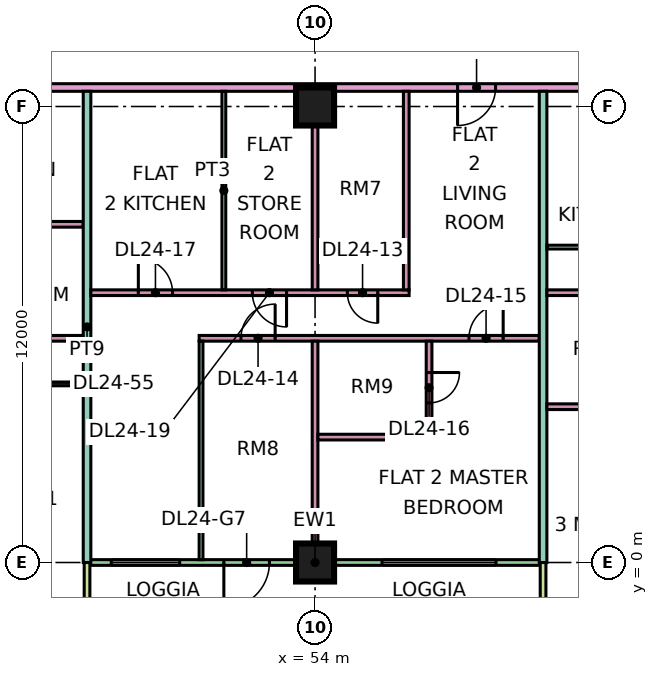
"""IFC4 building model, lengths in metres.
Left out: names, types, materials, properties, quantities, classifications, styles, units other than length and angle.
Written with IfcOpenShell. Run it as: python <this file> out.ifc"""

import sys

from ifc_helpers import new_model, si_unit, direction, frame, frame_2d, origin, origin_2d, place, context, subcontext, project, spatial, rectangle, extrude, element, fill, save


model = new_model("IFC4")
c1 = context("Model", 3, precision=1e-05, world=origin(), true_north=direction((0.0, 1.0)))
c2 = subcontext(c1, "Body", "Model", "MODEL_VIEW")
j1 = project(units=[si_unit("LENGTHUNIT", "METRE"), si_unit("PLANEANGLEUNIT", "RADIAN")], contexts=[c1])
p1 = place(None, origin())
s1 = spatial("IfcSite", under=j1, at=p1, CompositionType="ELEMENT")
p2 = place(p1, origin())
s2 = spatial("IfcBuilding", under=s1, at=p2, CompositionType="ELEMENT")
p3 = place(p2, frame((0.0, 0.0, 106.9)))
s3 = spatial("IfcBuildingStorey", under=s2, at=p3, CompositionType="ELEMENT", Elevation=106.9)
for number, where, z_axis, x_axis in (
    (1, (54.0, 0.0, 0.0), (0.0, 0.0, 1.0), (1.0, 0.0, 0.0)),
    (2, (54.0, 12.0, 0.0), (0.0, 0.0, 1.0), (1.0, 0.0, 0.0)),
):
    element("IfcColumn", number, at=place(p3, frame(where, z_axis=z_axis, x_axis=x_axis)), inside=s3, PredefinedType="COLUMN", context=c2, shape_type="SweptSolid", body=[
        extrude(rectangle(XDim=1.0, YDim=1.0, at=origin_2d()), origin(), (0.0, 0.0, 1.0), 3.75),
    ])
p4 = place(p3, frame((48.075, 0.0, 0.0), z_axis=(0.0, 0.0, 1.0), x_axis=(1.0, 0.0, 0.0)))
e3 = element("IfcWall", 3, at=p4, inside=s3, PredefinedType="SOLIDWALL", context=c2, shape_type="SweptSolid", body=[
    extrude(rectangle(XDim=11.85, YDim=0.15, at=frame_2d((5.925, 0.0))), origin(), (0.0, 0.0, 1.0), 3.35),
])
p5 = place(p4, frame((0.562, 0.0, 0.45)))
e4 = element("IfcOpeningElement", 4, at=p5, cuts=e3, PredefinedType="OPENING", context=c2, shape_type="SweptSolid", body=[
    extrude(rectangle(XDim=1.8, YDim=2.4, at=frame_2d((0.9, 1.2))), frame((0.0, 0.085, 0.0), z_axis=(0.0, -1.0, 0.0), x_axis=(1.0, 0.0, 0.0)), (0.0, 0.0, 1.0), 0.17),
])
p6 = place(p4, frame((3.525, 0.0, 0.0)))
e5 = element("IfcOpeningElement", 5, at=p6, cuts=e3, PredefinedType="OPENING", context=c2, shape_type="SweptSolid", body=[
    extrude(rectangle(XDim=1.2, YDim=2.4, at=frame_2d((0.6, 1.2))), frame((0.0, 0.085, 0.0), z_axis=(0.0, -1.0, 0.0), x_axis=(1.0, 0.0, 0.0)), (0.0, 0.0, 1.0), 0.17),
])
p7 = place(p4, frame((7.688, 0.0, 0.45)))
e6 = element("IfcOpeningElement", 6, at=p7, cuts=e3, PredefinedType="OPENING", context=c2, shape_type="SweptSolid", body=[
    extrude(rectangle(XDim=3.0, YDim=2.4, at=frame_2d((1.5, 1.2))), frame((0.0, 0.085, 0.0), z_axis=(0.0, -1.0, 0.0), x_axis=(1.0, 0.0, 0.0)), (0.0, 0.0, 1.0), 0.17),
])
for number, where, z_axis, x_axis in (
    (7, (48.0, -1.5, 0.0), (0.0, 0.0, 1.0), (0.0, 1.0, 0.0)),
    (8, (60.0, -1.5, 0.0), (0.0, 0.0, 1.0), (0.0, 1.0, 0.0)),
):
    element("IfcWall", number, at=place(p3, frame(where, z_axis=z_axis, x_axis=x_axis)), inside=s3, PredefinedType="SOLIDWALL", context=c2, shape_type="SweptSolid", body=[
        extrude(rectangle(XDim=1.5, YDim=0.15, at=frame_2d((0.75, 0.0))), origin(), (0.0, 0.0, 1.0), 3.35),
    ])
p8 = place(p3, frame((33.05, 4.7, 0.0), z_axis=(0.0, 0.0, 1.0), x_axis=(1.0, 0.0, 0.0)))
e9 = element("IfcWall", 9, at=p8, inside=s3, PredefinedType="PARTITIONING", context=c2, shape_type="SweptSolid", body=[
    extrude(rectangle(XDim=14.85, YDim=0.1, at=frame_2d((7.425, 0.0))), origin(), (0.0, 0.0, 1.0), 3.35),
])
p9 = place(p8, frame((10.0, 0.0, 0.0)))
e10 = element("IfcOpeningElement", 10, at=p9, cuts=e9, PredefinedType="OPENING", context=c2, shape_type="SweptSolid", body=[
    extrude(rectangle(XDim=0.9, YDim=2.1, at=frame_2d((0.45, 1.05))), frame((0.0, 0.06, 0.0), z_axis=(0.0, -1.0, 0.0), x_axis=(1.0, 0.0, 0.0)), (0.0, 0.0, 1.0), 0.12),
])
p10 = place(p8, frame((13.0, 0.0, 0.0)))
e11 = element("IfcOpeningElement", 11, at=p10, cuts=e9, PredefinedType="OPENING", context=c2, shape_type="SweptSolid", body=[
    extrude(rectangle(XDim=0.9, YDim=2.1, at=frame_2d((0.45, 1.05))), frame((0.0, 0.06, 0.0), z_axis=(0.0, -1.0, 0.0), x_axis=(1.0, 0.0, 0.0)), (0.0, 0.0, 1.0), 0.12),
])
p11 = place(p8, frame((4.0, 0.0, 0.0)))
e12 = element("IfcOpeningElement", 12, at=p11, cuts=e9, PredefinedType="OPENING", context=c2, shape_type="SweptSolid", body=[
    extrude(rectangle(XDim=0.9, YDim=2.1, at=frame_2d((0.45, 1.05))), frame((0.0, 0.06, 0.0), z_axis=(0.0, -1.0, 0.0), x_axis=(1.0, 0.0, 0.0)), (0.0, 0.0, 1.0), 0.12),
])
p12 = place(p3, frame((40.65, 12.5, 0.0), z_axis=(0.0, 0.0, 1.0), x_axis=(1.0, 0.0, 0.0)))
e13 = element("IfcWall", 13, at=p12, inside=s3, PredefinedType="PARTITIONING", context=c2, shape_type="SweptSolid", body=[
    extrude(rectangle(XDim=31.35, YDim=0.2, at=frame_2d((15.675, 0.0))), origin(), (0.0, 0.0, 1.0), 3.35),
])
p13 = place(p12, frame((17.1, 0.0, 0.0)))
e14 = element("IfcOpeningElement", 14, at=p13, cuts=e13, PredefinedType="OPENING", context=c2, shape_type="SweptSolid", body=[
    extrude(rectangle(XDim=1.0, YDim=2.1, at=frame_2d((0.5, 1.05))), frame((0.0, 0.11, 0.0), z_axis=(0.0, -1.0, 0.0), x_axis=(1.0, 0.0, 0.0)), (0.0, 0.0, 1.0), 0.22),
])
p14 = place(p12, frame((23.7, 0.0, 0.0)))
e15 = element("IfcOpeningElement", 15, at=p14, cuts=e13, PredefinedType="OPENING", context=c2, shape_type="SweptSolid", body=[
    extrude(rectangle(XDim=1.0, YDim=2.1, at=frame_2d((0.5, 1.05))), frame((0.0, 0.11, 0.0), z_axis=(0.0, -1.0, 0.0), x_axis=(1.0, 0.0, 0.0)), (0.0, 0.0, 1.0), 0.22),
])
p15 = place(p12, frame((1.05, 0.0, 0.0)))
e16 = element("IfcOpeningElement", 16, at=p15, cuts=e13, PredefinedType="OPENING", context=c2, shape_type="SweptSolid", body=[
    extrude(rectangle(XDim=1.0, YDim=2.1, at=frame_2d((0.5, 1.05))), frame((0.0, 0.11, 0.0), z_axis=(0.0, -1.0, 0.0), x_axis=(1.0, 0.0, 0.0)), (0.0, 0.0, 1.0), 0.22),
])
p16 = place(p3, frame((43.725, 5.9, 0.0), z_axis=(0.0, 0.0, 1.0), x_axis=(1.0, 0.0, 0.0)))
e17 = element("IfcWall", 17, at=p16, inside=s3, PredefinedType="PARTITIONING", context=c2, shape_type="SweptSolid", body=[
    extrude(rectangle(XDim=4.175, YDim=0.15, at=frame_2d((2.087, 0.0))), origin(), (0.0, 0.0, 1.0), 3.35),
])
p17 = place(p16, frame((1.675, 0.0, 0.0)))
e18 = element("IfcOpeningElement", 18, at=p17, cuts=e17, PredefinedType="OPENING", context=c2, shape_type="SweptSolid", body=[
    extrude(rectangle(XDim=0.8, YDim=2.1, at=frame_2d((0.4, 1.05))), frame((0.0, 0.085, 0.0), z_axis=(0.0, -1.0, 0.0), x_axis=(1.0, 0.0, 0.0)), (0.0, 0.0, 1.0), 0.17),
])
p18 = place(p3, frame((43.725, 8.9, 0.0), z_axis=(0.0, 0.0, 1.0), x_axis=(1.0, 0.0, 0.0)))
e19 = element("IfcWall", 19, at=p18, inside=s3, PredefinedType="PARTITIONING", context=c2, shape_type="SweptSolid", body=[
    extrude(rectangle(XDim=4.175, YDim=0.15, at=frame_2d((2.087, 0.0))), origin(), (0.0, 0.0, 1.0), 3.35),
])
p19 = place(p3, frame((48.0, 0.0, 0.0), z_axis=(0.0, 0.0, 1.0), x_axis=(0.0, 1.0, 0.0)))
e20 = element("IfcWall", 20, at=p19, inside=s3, PredefinedType="PARTITIONING", context=c2, shape_type="SweptSolid", body=[
    extrude(rectangle(XDim=12.4, YDim=0.2, at=frame_2d((6.2, 0.0))), origin(), (0.0, 0.0, 1.0), 3.35),
])
p20 = place(p3, frame((48.1, 7.1, 0.0), z_axis=(0.0, 0.0, 1.0), x_axis=(1.0, 0.0, 0.0)))
e21 = element("IfcWall", 21, at=p20, inside=s3, PredefinedType="PARTITIONING", context=c2, shape_type="SweptSolid", body=[
    extrude(rectangle(XDim=8.375, YDim=0.15, at=frame_2d((4.188, 0.0))), origin(), (0.0, 0.0, 1.0), 3.35),
])
p21 = place(p20, frame((6.75, 0.0, 0.0)))
e22 = element("IfcOpeningElement", 22, at=p21, cuts=e21, PredefinedType="OPENING", context=c2, shape_type="SweptSolid", body=[
    extrude(rectangle(XDim=0.8, YDim=2.1, at=frame_2d((0.4, 1.05))), frame((0.0, 0.085, 0.0), z_axis=(0.0, -1.0, 0.0), x_axis=(1.0, 0.0, 0.0)), (0.0, 0.0, 1.0), 0.17),
])
p22 = place(p20, frame((1.25, 0.0, 0.0)))
e23 = element("IfcOpeningElement", 23, at=p22, cuts=e21, PredefinedType="OPENING", context=c2, shape_type="SweptSolid", body=[
    extrude(rectangle(XDim=0.9, YDim=2.1, at=frame_2d((0.45, 1.05))), frame((0.0, 0.085, 0.0), z_axis=(0.0, -1.0, 0.0), x_axis=(1.0, 0.0, 0.0)), (0.0, 0.0, 1.0), 0.17),
])
p23 = place(p20, frame((4.25, 0.0, 0.0)))
e24 = element("IfcOpeningElement", 24, at=p23, cuts=e21, PredefinedType="OPENING", context=c2, shape_type="SweptSolid", body=[
    extrude(rectangle(XDim=0.9, YDim=2.1, at=frame_2d((0.45, 1.05))), frame((0.0, 0.085, 0.0), z_axis=(0.0, -1.0, 0.0), x_axis=(1.0, 0.0, 0.0)), (0.0, 0.0, 1.0), 0.17),
])
p24 = place(p3, frame((50.95, 5.9, 0.0), z_axis=(0.0, 0.0, 1.0), x_axis=(1.0, 0.0, 0.0)))
e25 = element("IfcWall", 25, at=p24, inside=s3, PredefinedType="PARTITIONING", context=c2, shape_type="SweptSolid", body=[
    extrude(rectangle(XDim=8.95, YDim=0.15, at=frame_2d((4.475, 0.0))), origin(), (0.0, 0.0, 1.0), 3.35),
])
p25 = place(p24, frame((1.1, 0.0, 0.0)))
e26 = element("IfcOpeningElement", 26, at=p25, cuts=e25, PredefinedType="OPENING", context=c2, shape_type="SweptSolid", body=[
    extrude(rectangle(XDim=0.9, YDim=2.1, at=frame_2d((0.45, 1.05))), frame((0.0, 0.085, 0.0), z_axis=(0.0, -1.0, 0.0), x_axis=(1.0, 0.0, 0.0)), (0.0, 0.0, 1.0), 0.17),
])
p26 = place(p24, frame((7.1, 0.0, 0.0)))
e27 = element("IfcOpeningElement", 27, at=p26, cuts=e25, PredefinedType="OPENING", context=c2, shape_type="SweptSolid", body=[
    extrude(rectangle(XDim=0.9, YDim=2.1, at=frame_2d((0.45, 1.05))), frame((0.0, 0.085, 0.0), z_axis=(0.0, -1.0, 0.0), x_axis=(1.0, 0.0, 0.0)), (0.0, 0.0, 1.0), 0.17),
])
p27 = place(p3, frame((51.0, 0.074, 0.0), z_axis=(0.0, 0.0, 1.0), x_axis=(0.0, 1.0, 0.0)))
e28 = element("IfcWall", 28, at=p27, inside=s3, PredefinedType="PARTITIONING", context=c2, shape_type="SweptSolid", body=[
    extrude(rectangle(XDim=5.751, YDim=0.1, at=frame_2d((2.875, 0.0))), origin(), (0.0, 0.0, 1.0), 3.35),
])
p28 = place(p3, frame((51.6, 7.175, 0.0), z_axis=(0.0, 0.0, 1.0), x_axis=(0.0, 1.0, 0.0)))
e29 = element("IfcWall", 29, at=p28, inside=s3, PredefinedType="PARTITIONING", context=c2, shape_type="SweptSolid", body=[
    extrude(rectangle(XDim=5.225, YDim=0.1, at=frame_2d((2.612, 0.0))), origin(), (0.0, 0.0, 1.0), 3.35),
])
p29 = place(p3, frame((54.0, 0.074, 0.0), z_axis=(0.0, 0.0, 1.0), x_axis=(0.0, 1.0, 0.0)))
e30 = element("IfcWall", 30, at=p29, inside=s3, PredefinedType="PARTITIONING", context=c2, shape_type="SweptSolid", body=[
    extrude(rectangle(XDim=5.751, YDim=0.15, at=frame_2d((2.875, 0.0))), origin(), (0.0, 0.0, 1.0), 3.35),
])
p30 = place(p3, frame((54.0, 7.175, 0.0), z_axis=(0.0, 0.0, 1.0), x_axis=(0.0, 1.0, 0.0)))
e31 = element("IfcWall", 31, at=p30, inside=s3, PredefinedType="PARTITIONING", context=c2, shape_type="SweptSolid", body=[
    extrude(rectangle(XDim=5.225, YDim=0.15, at=frame_2d((2.612, 0.0))), origin(), (0.0, 0.0, 1.0), 3.35),
])
p31 = place(p3, frame((54.075, 3.3, 0.0), z_axis=(0.0, 0.0, 1.0), x_axis=(1.0, 0.0, 0.0)))
e32 = element("IfcWall", 32, at=p31, inside=s3, PredefinedType="PARTITIONING", context=c2, shape_type="SweptSolid", body=[
    extrude(rectangle(XDim=3.0, YDim=0.15, at=frame_2d((1.5, 0.0))), origin(), (0.0, 0.0, 1.0), 3.35),
])
p32 = place(p3, frame((56.4, 7.175, 0.0), z_axis=(0.0, 0.0, 1.0), x_axis=(0.0, 1.0, 0.0)))
e33 = element("IfcWall", 33, at=p32, inside=s3, PredefinedType="PARTITIONING", context=c2, shape_type="SweptSolid", body=[
    extrude(rectangle(XDim=5.225, YDim=0.15, at=frame_2d((2.612, 0.0))), origin(), (0.0, 0.0, 1.0), 3.35),
])
p33 = place(p3, frame((57.0, 3.375, 0.0), z_axis=(0.0, 0.0, 1.0), x_axis=(0.0, 1.0, 0.0)))
e34 = element("IfcWall", 34, at=p33, inside=s3, PredefinedType="PARTITIONING", context=c2, shape_type="SweptSolid", body=[
    extrude(rectangle(XDim=2.45, YDim=0.15, at=frame_2d((1.225, 0.0))), origin(), (0.0, 0.0, 1.0), 3.35),
])
p34 = place(p33, frame((0.825, 0.0, 0.0)))
e35 = element("IfcOpeningElement", 35, at=p34, cuts=e34, PredefinedType="OPENING", context=c2, shape_type="SweptSolid", body=[
    extrude(rectangle(XDim=0.8, YDim=2.1, at=frame_2d((0.4, 1.05))), frame((0.0, 0.085, 0.0), z_axis=(0.0, -1.0, 0.0), x_axis=(1.0, 0.0, 0.0)), (0.0, 0.0, 1.0), 0.17),
])
p35 = place(p3, frame((60.0, 0.0, 0.0), z_axis=(0.0, 0.0, 1.0), x_axis=(0.0, 1.0, 0.0)))
e36 = element("IfcWall", 36, at=p35, inside=s3, PredefinedType="PARTITIONING", context=c2, shape_type="SweptSolid", body=[
    extrude(rectangle(XDim=12.4, YDim=0.2, at=frame_2d((6.2, 0.0))), origin(), (0.0, 0.0, 1.0), 3.35),
])
p36 = place(p3, frame((60.1, 4.1, 0.0), z_axis=(0.0, 0.0, 1.0), x_axis=(1.0, 0.0, 0.0)))
e37 = element("IfcWall", 37, at=p36, inside=s3, PredefinedType="PARTITIONING", context=c2, shape_type="SweptSolid", body=[
    extrude(rectangle(XDim=2.825, YDim=0.15, at=frame_2d((1.413, 0.0))), origin(), (0.0, 0.0, 1.0), 3.35),
])
p37 = place(p3, frame((60.1, 7.1, 0.0), z_axis=(0.0, 0.0, 1.0), x_axis=(1.0, 0.0, 0.0)))
e38 = element("IfcWall", 38, at=p37, inside=s3, PredefinedType="PARTITIONING", context=c2, shape_type="SweptSolid", body=[
    extrude(rectangle(XDim=5.95, YDim=0.15, at=frame_2d((2.975, 0.0))), origin(), (0.0, 0.0, 1.0), 3.35),
])
p38 = place(p37, frame((3.95, 0.0, 0.0)))
e39 = element("IfcOpeningElement", 39, at=p38, cuts=e38, PredefinedType="OPENING", context=c2, shape_type="SweptSolid", body=[
    extrude(rectangle(XDim=0.9, YDim=2.1, at=frame_2d((0.45, 1.05))), frame((0.0, 0.085, 0.0), z_axis=(0.0, -1.0, 0.0), x_axis=(1.0, 0.0, 0.0)), (0.0, 0.0, 1.0), 0.17),
])
p39 = place(p3, frame((60.1, 8.3, 0.0), z_axis=(0.0, 0.0, 1.0), x_axis=(1.0, 0.0, 0.0)))
e40 = element("IfcWall", 40, at=p39, inside=s3, PredefinedType="PARTITIONING", context=c2, shape_type="SweptSolid", body=[
    extrude(rectangle(XDim=2.85, YDim=0.1, at=frame_2d((1.425, 0.0))), origin(), (0.0, 0.0, 1.0), 3.35),
])
p40 = place(p5, origin())
e41 = element("IfcWindow", 41, at=p40, inside=s3, PartitioningType="SINGLE_PANEL", PredefinedType="WINDOW", context=c2, shape_type="SweptSolid", body=[
    extrude(rectangle(XDim=1.8, YDim=2.4, at=frame_2d((0.9, 1.2))), frame((0.0, 0.03, 0.0), z_axis=(0.0, -1.0, 0.0), x_axis=(1.0, 0.0, 0.0)), (0.0, 0.0, 1.0), 0.06),
])
fill(e4, e41)
p41 = place(p6, frame((1.2, 0.0, 0.0), z_axis=(0.0, 0.0, 1.0), x_axis=(-1.0, 0.0, 0.0)))
e42 = element("IfcDoor", 42, at=p41, inside=s3, OperationType="DOUBLE_DOOR_SINGLE_SWING", PredefinedType="DOOR", context=c2, shape_type="SweptSolid", body=[
    extrude(rectangle(XDim=1.2, YDim=2.4, at=frame_2d((0.6, 1.2))), frame((0.0, 0.025, 0.0), z_axis=(0.0, -1.0, 0.0), x_axis=(1.0, 0.0, 0.0)), (0.0, 0.0, 1.0), 0.05),
])
fill(e5, e42)
p42 = place(p7, origin())
e43 = element("IfcWindow", 43, at=p42, inside=s3, PartitioningType="SINGLE_PANEL", PredefinedType="WINDOW", context=c2, shape_type="SweptSolid", body=[
    extrude(rectangle(XDim=3.0, YDim=2.4, at=frame_2d((1.5, 1.2))), frame((0.0, 0.03, 0.0), z_axis=(0.0, -1.0, 0.0), x_axis=(1.0, 0.0, 0.0)), (0.0, 0.0, 1.0), 0.06),
])
fill(e6, e43)
p43 = place(p21, origin())
e44 = element("IfcDoor", 44, at=p43, inside=s3, OperationType="SINGLE_SWING_RIGHT", PredefinedType="DOOR", context=c2, shape_type="SweptSolid", body=[
    extrude(rectangle(XDim=0.8, YDim=2.1, at=frame_2d((0.4, 1.05))), frame((0.0, 0.025, 0.0), z_axis=(0.0, -1.0, 0.0), x_axis=(1.0, 0.0, 0.0)), (0.0, 0.0, 1.0), 0.05),
])
fill(e22, e44)
p44 = place(p25, frame((0.9, 0.0, 0.0), z_axis=(0.0, 0.0, 1.0), x_axis=(-1.0, 0.0, 0.0)))
e45 = element("IfcDoor", 45, at=p44, inside=s3, OperationType="SINGLE_SWING_RIGHT", PredefinedType="DOOR", context=c2, shape_type="SweptSolid", body=[
    extrude(rectangle(XDim=0.9, YDim=2.1, at=frame_2d((0.45, 1.05))), frame((0.0, 0.025, 0.0), z_axis=(0.0, -1.0, 0.0), x_axis=(1.0, 0.0, 0.0)), (0.0, 0.0, 1.0), 0.05),
])
fill(e26, e45)
p45 = place(p26, frame((0.9, 0.0, 0.0), z_axis=(0.0, 0.0, 1.0), x_axis=(-1.0, 0.0, 0.0)))
e46 = element("IfcDoor", 46, at=p45, inside=s3, OperationType="SINGLE_SWING_RIGHT", PredefinedType="DOOR", context=c2, shape_type="SweptSolid", body=[
    extrude(rectangle(XDim=0.9, YDim=2.1, at=frame_2d((0.45, 1.05))), frame((0.0, 0.025, 0.0), z_axis=(0.0, -1.0, 0.0), x_axis=(1.0, 0.0, 0.0)), (0.0, 0.0, 1.0), 0.05),
])
fill(e27, e46)
p46 = place(p34, origin())
e47 = element("IfcDoor", 47, at=p46, inside=s3, OperationType="SINGLE_SWING_RIGHT", PredefinedType="DOOR", context=c2, shape_type="SweptSolid", body=[
    extrude(rectangle(XDim=0.8, YDim=2.1, at=frame_2d((0.4, 1.05))), frame((0.0, 0.025, 0.0), z_axis=(0.0, -1.0, 0.0), x_axis=(1.0, 0.0, 0.0)), (0.0, 0.0, 1.0), 0.05),
])
fill(e35, e47)
p47 = place(p22, origin())
e48 = element("IfcDoor", 48, at=p47, inside=s3, OperationType="SINGLE_SWING_LEFT", PredefinedType="DOOR", context=c2, shape_type="SweptSolid", body=[
    extrude(rectangle(XDim=0.9, YDim=2.1, at=frame_2d((0.45, 1.05))), frame((0.0, 0.025, 0.0), z_axis=(0.0, -1.0, 0.0), x_axis=(1.0, 0.0, 0.0)), (0.0, 0.0, 1.0), 0.05),
])
fill(e23, e48)
p48 = place(p13, frame((1.0, 0.0, 0.0), z_axis=(0.0, 0.0, 1.0), x_axis=(-1.0, 0.0, 0.0)))
e49 = element("IfcDoor", 49, at=p48, inside=s3, OperationType="SINGLE_SWING_LEFT", PredefinedType="DOOR", context=c2, shape_type="SweptSolid", body=[
    extrude(rectangle(XDim=1.0, YDim=2.1, at=frame_2d((0.5, 1.05))), frame((0.0, 0.025, 0.0), z_axis=(0.0, -1.0, 0.0), x_axis=(1.0, 0.0, 0.0)), (0.0, 0.0, 1.0), 0.05),
])
fill(e14, e49)
p49 = place(p23, origin())
e50 = element("IfcDoor", 50, at=p49, inside=s3, OperationType="SINGLE_SWING_RIGHT", PredefinedType="DOOR", context=c2, shape_type="SweptSolid", body=[
    extrude(rectangle(XDim=0.9, YDim=2.1, at=frame_2d((0.45, 1.05))), frame((0.0, 0.025, 0.0), z_axis=(0.0, -1.0, 0.0), x_axis=(1.0, 0.0, 0.0)), (0.0, 0.0, 1.0), 0.05),
])
fill(e24, e50)
save(model, sys.argv[1])
